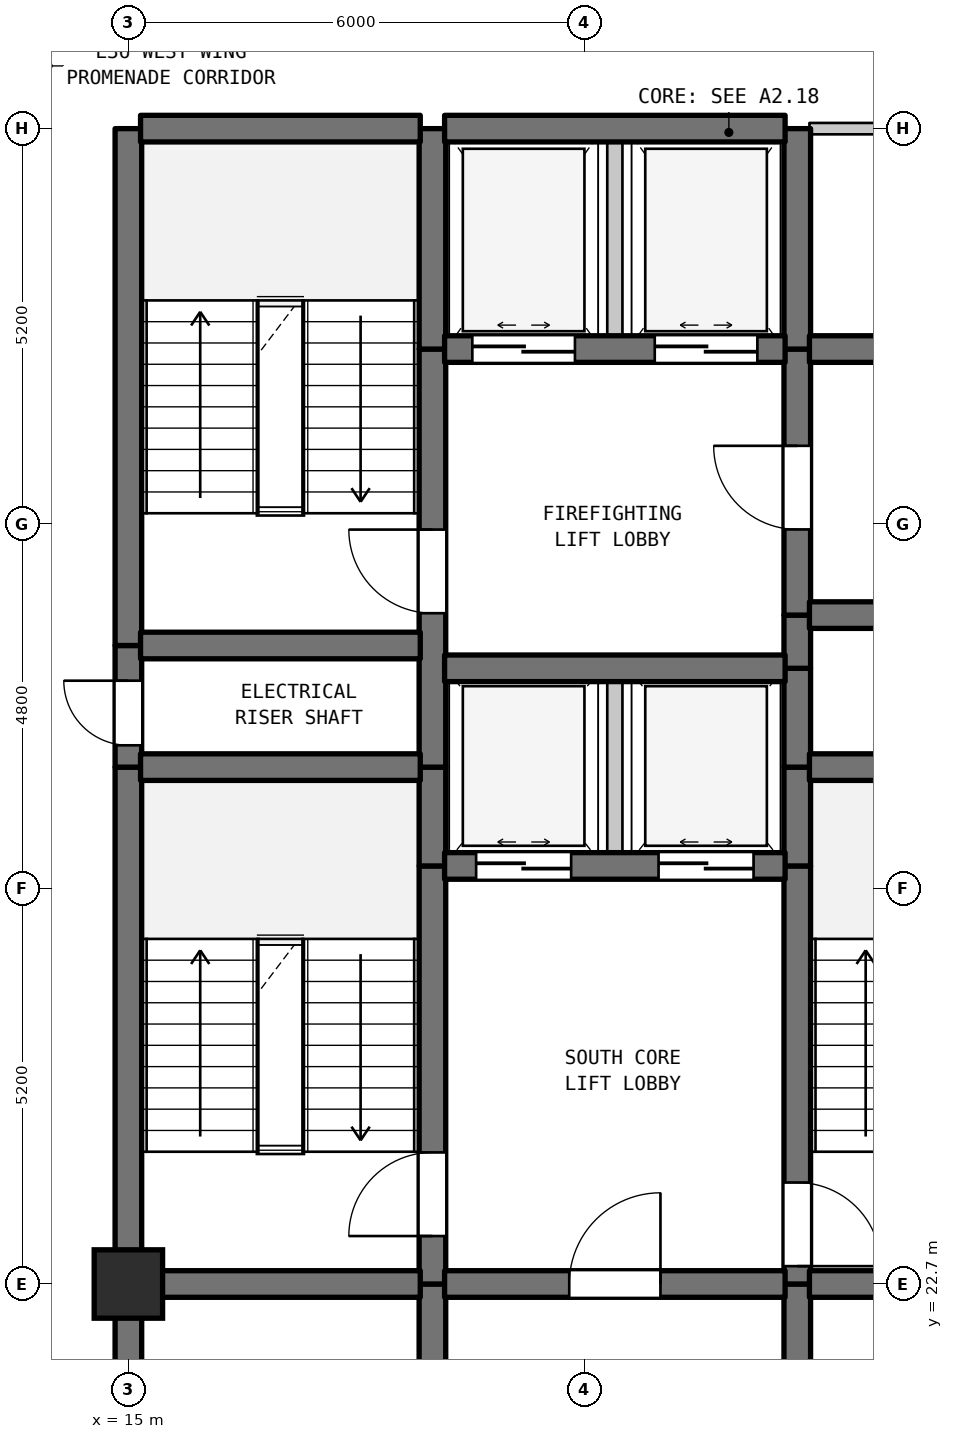
"""IFC4 building model, lengths in metres.
Left out: names, types, materials, properties, quantities, classifications, styles, units other than length and angle.
Written with IfcOpenShell. Run it as: python <this file> out.ifc"""

import sys

from ifc_helpers import new_model, si_unit, direction, frame, frame_2d, origin, origin_2d, place, context, subcontext, project, spatial, rectangle, extrude, element, fill, save


model = new_model("IFC4")
c1 = context("Model", 3, precision=1e-05, world=origin(), true_north=direction((0.0, 1.0)))
c2 = subcontext(c1, "Body", "Model", "MODEL_VIEW")
j1 = project(units=[si_unit("LENGTHUNIT", "METRE"), si_unit("PLANEANGLEUNIT", "RADIAN")], contexts=[c1])
p1 = place(None, origin())
s1 = spatial("IfcSite", under=j1, at=p1, CompositionType="ELEMENT")
p2 = place(p1, origin())
s2 = spatial("IfcBuilding", under=s1, at=p2, CompositionType="ELEMENT")
p3 = place(p2, frame((0.0, 0.0, 148.3)))
s3 = spatial("IfcBuildingStorey", under=s2, at=p3, CompositionType="ELEMENT", Elevation=148.3)
p4 = place(p3, frame((15.0, 22.7, 0.0), z_axis=(0.0, 0.0, 1.0), x_axis=(1.0, 0.0, 0.0)))
e1 = element("IfcColumn", 1, at=p4, inside=s3, PredefinedType="COLUMN", context=c2, shape_type="SweptSolid", body=[
    extrude(rectangle(XDim=0.9, YDim=0.9, at=origin_2d()), origin(), (0.0, 0.0, 1.0), 3.7),
])
p5 = place(p3, frame((15.0, 19.5, 0.0), z_axis=(0.0, 0.0, 1.0), x_axis=(0.0, 1.0, 0.0)))
e2 = element("IfcWall", 2, at=p5, inside=s3, PredefinedType="SHEAR", context=c2, shape_type="SweptSolid", body=[
    extrude(rectangle(XDim=3.2, YDim=0.35, at=frame_2d((1.6, 0.0))), origin(), (0.0, 0.0, 1.0), 3.385),
])
p6 = place(p3, frame((15.0, 22.7, 0.0), z_axis=(0.0, 0.0, 1.0), x_axis=(0.0, 1.0, 0.0)))
e3 = element("IfcWall", 3, at=p6, inside=s3, PredefinedType="SHEAR", context=c2, shape_type="SweptSolid", body=[
    extrude(rectangle(XDim=6.8, YDim=0.35, at=frame_2d((3.4, 0.0))), origin(), (0.0, 0.0, 1.0), 3.385),
])
p7 = place(p3, frame((15.0, 29.5, 0.0), z_axis=(0.0, 0.0, 1.0), x_axis=(0.0, 1.0, 0.0)))
e4 = element("IfcWall", 4, at=p7, inside=s3, PredefinedType="SHEAR", context=c2, shape_type="SweptSolid", body=[
    extrude(rectangle(XDim=1.6, YDim=0.35, at=frame_2d((0.8, 0.0))), origin(), (0.0, 0.0, 1.0), 3.385),
])
p8 = place(p7, frame((0.287, 0.0, 0.0)))
e5 = element("IfcOpeningElement", 5, at=p8, cuts=e4, PredefinedType="OPENING", context=c2, shape_type="SweptSolid", body=[
    extrude(rectangle(XDim=0.85, YDim=2.1, at=frame_2d((0.425, 1.05))), frame((0.0, 0.185, 0.0), z_axis=(0.0, -1.0, 0.0), x_axis=(1.0, 0.0, 0.0)), (0.0, 0.0, 1.0), 0.37),
])
p9 = place(p3, frame((15.0, 31.1, 0.0), z_axis=(0.0, 0.0, 1.0), x_axis=(0.0, 1.0, 0.0)))
e6 = element("IfcWall", 6, at=p9, inside=s3, PredefinedType="SHEAR", context=c2, shape_type="SweptSolid", body=[
    extrude(rectangle(XDim=6.8, YDim=0.35, at=frame_2d((3.4, 0.0))), origin(), (0.0, 0.0, 1.0), 3.385),
])
p10 = place(p3, frame((19.0, 19.5, 0.0), z_axis=(0.0, 0.0, 1.0), x_axis=(0.0, 1.0, 0.0)))
e7 = element("IfcWall", 7, at=p10, inside=s3, PredefinedType="SHEAR", context=c2, shape_type="SweptSolid", body=[
    extrude(rectangle(XDim=3.2, YDim=0.35, at=frame_2d((1.6, 0.0))), origin(), (0.0, 0.0, 1.0), 3.385),
])
p11 = place(p3, frame((19.0, 22.7, 0.0), z_axis=(0.0, 0.0, 1.0), x_axis=(0.0, 1.0, 0.0)))
e8 = element("IfcWall", 8, at=p11, inside=s3, PredefinedType="SHEAR", context=c2, shape_type="SweptSolid", body=[
    extrude(rectangle(XDim=5.5, YDim=0.35, at=frame_2d((2.75, 0.0))), origin(), (0.0, 0.0, 1.0), 3.385),
])
p12 = place(p11, frame((0.631, 0.0, 0.0)))
e9 = element("IfcOpeningElement", 9, at=p12, cuts=e8, PredefinedType="OPENING", context=c2, shape_type="SweptSolid", body=[
    extrude(rectangle(XDim=1.1, YDim=2.15, at=frame_2d((0.55, 1.075))), frame((0.0, 0.185, 0.0), z_axis=(0.0, -1.0, 0.0), x_axis=(1.0, 0.0, 0.0)), (0.0, 0.0, 1.0), 0.37),
])
p13 = place(p3, frame((19.0, 28.2, 0.0), z_axis=(0.0, 0.0, 1.0), x_axis=(0.0, 1.0, 0.0)))
e10 = element("IfcWall", 10, at=p13, inside=s3, PredefinedType="SHEAR", context=c2, shape_type="SweptSolid", body=[
    extrude(rectangle(XDim=1.3, YDim=0.35, at=frame_2d((0.65, 0.0))), origin(), (0.0, 0.0, 1.0), 3.385),
])
p14 = place(p3, frame((19.0, 29.5, 0.0), z_axis=(0.0, 0.0, 1.0), x_axis=(0.0, 1.0, 0.0)))
e11 = element("IfcWall", 11, at=p14, inside=s3, PredefinedType="SHEAR", context=c2, shape_type="SweptSolid", body=[
    extrude(rectangle(XDim=5.5, YDim=0.35, at=frame_2d((2.75, 0.0))), origin(), (0.0, 0.0, 1.0), 3.385),
])
p15 = place(p14, frame((2.025, 0.0, 0.0)))
e12 = element("IfcOpeningElement", 12, at=p15, cuts=e11, PredefinedType="OPENING", context=c2, shape_type="SweptSolid", body=[
    extrude(rectangle(XDim=1.1, YDim=2.15, at=frame_2d((0.55, 1.075))), frame((0.0, 0.185, 0.0), z_axis=(0.0, -1.0, 0.0), x_axis=(1.0, 0.0, 0.0)), (0.0, 0.0, 1.0), 0.37),
])
p16 = place(p3, frame((19.0, 35.0, 0.0), z_axis=(0.0, 0.0, 1.0), x_axis=(0.0, 1.0, 0.0)))
e13 = element("IfcWall", 13, at=p16, inside=s3, PredefinedType="SHEAR", context=c2, shape_type="SweptSolid", body=[
    extrude(rectangle(XDim=2.9, YDim=0.35, at=frame_2d((1.45, 0.0))), origin(), (0.0, 0.0, 1.0), 3.385),
])
p17 = place(p3, frame((21.4, 28.2, 0.0), z_axis=(0.0, 0.0, 1.0), x_axis=(0.0, 1.0, 0.0)))
e14 = element("IfcWall", 14, at=p17, inside=s3, PredefinedType="STANDARD", context=c2, shape_type="SweptSolid", body=[
    extrude(rectangle(XDim=2.6, YDim=0.2, at=frame_2d((1.3, 0.0))), origin(), (0.0, 0.0, 1.0), 3.385),
])
p18 = place(p3, frame((21.4, 35.0, 0.0), z_axis=(0.0, 0.0, 1.0), x_axis=(0.0, 1.0, 0.0)))
e15 = element("IfcWall", 15, at=p18, inside=s3, PredefinedType="STANDARD", context=c2, shape_type="SweptSolid", body=[
    extrude(rectangle(XDim=2.9, YDim=0.2, at=frame_2d((1.45, 0.0))), origin(), (0.0, 0.0, 1.0), 3.385),
])
p19 = place(p3, frame((23.8, 19.5, 0.0), z_axis=(0.0, 0.0, 1.0), x_axis=(0.0, 1.0, 0.0)))
e16 = element("IfcWall", 16, at=p19, inside=s3, PredefinedType="SHEAR", context=c2, shape_type="SweptSolid", body=[
    extrude(rectangle(XDim=3.2, YDim=0.35, at=frame_2d((1.6, 0.0))), origin(), (0.0, 0.0, 1.0), 3.385),
])
p20 = place(p3, frame((23.8, 22.7, 0.0), z_axis=(0.0, 0.0, 1.0), x_axis=(0.0, 1.0, 0.0)))
e17 = element("IfcWall", 17, at=p20, inside=s3, PredefinedType="SHEAR", context=c2, shape_type="SweptSolid", body=[
    extrude(rectangle(XDim=5.5, YDim=0.35, at=frame_2d((2.75, 0.0))), origin(), (0.0, 0.0, 1.0), 3.385),
])
p21 = place(p20, frame((0.235, 0.0, 0.0)))
e18 = element("IfcOpeningElement", 18, at=p21, cuts=e17, PredefinedType="OPENING", context=c2, shape_type="SweptSolid", body=[
    extrude(rectangle(XDim=1.1, YDim=2.15, at=frame_2d((0.55, 1.075))), frame((0.0, 0.185, 0.0), z_axis=(0.0, -1.0, 0.0), x_axis=(1.0, 0.0, 0.0)), (0.0, 0.0, 1.0), 0.37),
])
for number, where, z_axis, x_axis in (
    (19, (23.8, 28.2, 0.0), (0.0, 0.0, 1.0), (0.0, 1.0, 0.0)),
    (20, (23.8, 29.5, 0.0), (0.0, 0.0, 1.0), (0.0, 1.0, 0.0)),
):
    element("IfcWall", number, at=place(p3, frame(where, z_axis=z_axis, x_axis=x_axis)), inside=s3, PredefinedType="SHEAR", context=c2, shape_type="SweptSolid", body=[
        extrude(rectangle(XDim=1.3, YDim=0.35, at=frame_2d((0.65, 0.0))), origin(), (0.0, 0.0, 1.0), 3.385),
    ])
p22 = place(p3, frame((23.8, 30.8, 0.0), z_axis=(0.0, 0.0, 1.0), x_axis=(0.0, 1.0, 0.0)))
e21 = element("IfcWall", 21, at=p22, inside=s3, PredefinedType="SHEAR", context=c2, shape_type="SweptSolid", body=[
    extrude(rectangle(XDim=0.7, YDim=0.35, at=frame_2d((0.35, 0.0))), origin(), (0.0, 0.0, 1.0), 3.385),
])
p23 = place(p3, frame((23.8, 31.5, 0.0), z_axis=(0.0, 0.0, 1.0), x_axis=(0.0, 1.0, 0.0)))
e22 = element("IfcWall", 22, at=p23, inside=s3, PredefinedType="SHEAR", context=c2, shape_type="SweptSolid", body=[
    extrude(rectangle(XDim=3.5, YDim=0.35, at=frame_2d((1.75, 0.0))), origin(), (0.0, 0.0, 1.0), 3.385),
])
p24 = place(p23, frame((1.127, 0.0, 0.0)))
e23 = element("IfcOpeningElement", 23, at=p24, cuts=e22, PredefinedType="OPENING", context=c2, shape_type="SweptSolid", body=[
    extrude(rectangle(XDim=1.1, YDim=2.15, at=frame_2d((0.55, 1.075))), frame((0.0, 0.185, 0.0), z_axis=(0.0, -1.0, 0.0), x_axis=(1.0, 0.0, 0.0)), (0.0, 0.0, 1.0), 0.37),
])
p25 = place(p3, frame((23.8, 35.0, 0.0), z_axis=(0.0, 0.0, 1.0), x_axis=(0.0, 1.0, 0.0)))
e24 = element("IfcWall", 24, at=p25, inside=s3, PredefinedType="SHEAR", context=c2, shape_type="SweptSolid", body=[
    extrude(rectangle(XDim=2.9, YDim=0.35, at=frame_2d((1.45, 0.0))), origin(), (0.0, 0.0, 1.0), 3.385),
])
p26 = place(p3, frame((15.16, 22.7, 0.0), z_axis=(0.0, 0.0, 1.0), x_axis=(1.0, 0.0, 0.0)))
e25 = element("IfcWall", 25, at=p26, inside=s3, PredefinedType="SHEAR", context=c2, shape_type="SweptSolid", body=[
    extrude(rectangle(XDim=3.68, YDim=0.35, at=frame_2d((1.84, 0.0))), origin(), (0.0, 0.0, 1.0), 3.385),
])
p27 = place(p3, frame((19.16, 22.7, 0.0), z_axis=(0.0, 0.0, 1.0), x_axis=(1.0, 0.0, 0.0)))
e26 = element("IfcWall", 26, at=p27, inside=s3, PredefinedType="SHEAR", context=c2, shape_type="SweptSolid", body=[
    extrude(rectangle(XDim=4.48, YDim=0.35, at=frame_2d((2.24, 0.0))), origin(), (0.0, 0.0, 1.0), 3.385),
])
p28 = place(p27, frame((1.64, 0.0, 0.0)))
e27 = element("IfcOpeningElement", 27, at=p28, cuts=e26, PredefinedType="OPENING", context=c2, shape_type="SweptSolid", body=[
    extrude(rectangle(XDim=1.2, YDim=2.2, at=frame_2d((0.6, 1.1))), frame((0.0, 0.185, 0.0), z_axis=(0.0, -1.0, 0.0), x_axis=(1.0, 0.0, 0.0)), (0.0, 0.0, 1.0), 0.37),
])
p29 = place(p3, frame((23.96, 22.7, 0.0), z_axis=(0.0, 0.0, 1.0), x_axis=(1.0, 0.0, 0.0)))
e28 = element("IfcWall", 28, at=p29, inside=s3, PredefinedType="SHEAR", context=c2, shape_type="SweptSolid", body=[
    extrude(rectangle(XDim=3.155, YDim=0.35, at=frame_2d((1.578, 0.0))), origin(), (0.0, 0.0, 1.0), 3.385),
])
p30 = place(p3, frame((19.16, 28.2, 0.0), z_axis=(0.0, 0.0, 1.0), x_axis=(1.0, 0.0, 0.0)))
e29 = element("IfcWall", 29, at=p30, inside=s3, PredefinedType="SHEAR", context=c2, shape_type="SweptSolid", body=[
    extrude(rectangle(XDim=4.48, YDim=0.35, at=frame_2d((2.24, 0.0))), origin(), (0.0, 0.0, 1.0), 3.385),
])
p31 = place(p30, frame((0.415, 0.0, 0.0)))
e30 = element("IfcOpeningElement", 30, at=p31, cuts=e29, PredefinedType="OPENING", context=c2, shape_type="SweptSolid", body=[
    extrude(rectangle(XDim=1.25, YDim=2.2, at=frame_2d((0.625, 1.1))), frame((0.0, 0.185, 0.0), z_axis=(0.0, -1.0, 0.0), x_axis=(1.0, 0.0, 0.0)), (0.0, 0.0, 1.0), 0.37),
])
p32 = place(p30, frame((2.815, 0.0, 0.0)))
e31 = element("IfcOpeningElement", 31, at=p32, cuts=e29, PredefinedType="OPENING", context=c2, shape_type="SweptSolid", body=[
    extrude(rectangle(XDim=1.25, YDim=2.2, at=frame_2d((0.625, 1.1))), frame((0.0, 0.185, 0.0), z_axis=(0.0, -1.0, 0.0), x_axis=(1.0, 0.0, 0.0)), (0.0, 0.0, 1.0), 0.37),
])
p33 = place(p3, frame((15.16, 29.5, 0.0), z_axis=(0.0, 0.0, 1.0), x_axis=(1.0, 0.0, 0.0)))
e32 = element("IfcWall", 32, at=p33, inside=s3, PredefinedType="SHEAR", context=c2, shape_type="SweptSolid", body=[
    extrude(rectangle(XDim=3.68, YDim=0.35, at=frame_2d((1.84, 0.0))), origin(), (0.0, 0.0, 1.0), 3.385),
])
p34 = place(p3, frame((23.96, 29.5, 0.0), z_axis=(0.0, 0.0, 1.0), x_axis=(1.0, 0.0, 0.0)))
e33 = element("IfcWall", 33, at=p34, inside=s3, PredefinedType="SHEAR", context=c2, shape_type="SweptSolid", body=[
    extrude(rectangle(XDim=3.18, YDim=0.35, at=frame_2d((1.59, 0.0))), origin(), (0.0, 0.0, 1.0), 3.385),
])
p35 = place(p3, frame((19.16, 30.8, 0.0), z_axis=(0.0, 0.0, 1.0), x_axis=(1.0, 0.0, 0.0)))
e34 = element("IfcWall", 34, at=p35, inside=s3, PredefinedType="SHEAR", context=c2, shape_type="SweptSolid", body=[
    extrude(rectangle(XDim=4.48, YDim=0.35, at=frame_2d((2.24, 0.0))), origin(), (0.0, 0.0, 1.0), 3.385),
])
p36 = place(p3, frame((15.16, 31.1, 0.0), z_axis=(0.0, 0.0, 1.0), x_axis=(1.0, 0.0, 0.0)))
e35 = element("IfcWall", 35, at=p36, inside=s3, PredefinedType="SHEAR", context=c2, shape_type="SweptSolid", body=[
    extrude(rectangle(XDim=3.68, YDim=0.35, at=frame_2d((1.84, 0.0))), origin(), (0.0, 0.0, 1.0), 3.385),
])
p37 = place(p3, frame((23.96, 31.5, 0.0), z_axis=(0.0, 0.0, 1.0), x_axis=(1.0, 0.0, 0.0)))
e36 = element("IfcWall", 36, at=p37, inside=s3, PredefinedType="SHEAR", context=c2, shape_type="SweptSolid", body=[
    extrude(rectangle(XDim=3.18, YDim=0.35, at=frame_2d((1.59, 0.0))), origin(), (0.0, 0.0, 1.0), 3.385),
])
p38 = place(p37, frame((1.094, 0.0, 0.0)))
e37 = element("IfcOpeningElement", 37, at=p38, cuts=e36, PredefinedType="OPENING", context=c2, shape_type="SweptSolid", body=[
    extrude(rectangle(XDim=0.85, YDim=2.1, at=frame_2d((0.425, 1.05))), frame((0.0, 0.185, 0.0), z_axis=(0.0, -1.0, 0.0), x_axis=(1.0, 0.0, 0.0)), (0.0, 0.0, 1.0), 0.37),
])
p39 = place(p3, frame((19.16, 35.0, 0.0), z_axis=(0.0, 0.0, 1.0), x_axis=(1.0, 0.0, 0.0)))
e38 = element("IfcWall", 38, at=p39, inside=s3, PredefinedType="SHEAR", context=c2, shape_type="SweptSolid", body=[
    extrude(rectangle(XDim=4.48, YDim=0.35, at=frame_2d((2.24, 0.0))), origin(), (0.0, 0.0, 1.0), 3.385),
])
p40 = place(p39, frame((0.365, 0.0, 0.0)))
e39 = element("IfcOpeningElement", 39, at=p40, cuts=e38, PredefinedType="OPENING", context=c2, shape_type="SweptSolid", body=[
    extrude(rectangle(XDim=1.35, YDim=2.2, at=frame_2d((0.675, 1.1))), frame((0.0, 0.185, 0.0), z_axis=(0.0, -1.0, 0.0), x_axis=(1.0, 0.0, 0.0)), (0.0, 0.0, 1.0), 0.37),
])
p41 = place(p39, frame((2.765, 0.0, 0.0)))
e40 = element("IfcOpeningElement", 40, at=p41, cuts=e38, PredefinedType="OPENING", context=c2, shape_type="SweptSolid", body=[
    extrude(rectangle(XDim=1.35, YDim=2.2, at=frame_2d((0.675, 1.1))), frame((0.0, 0.185, 0.0), z_axis=(0.0, -1.0, 0.0), x_axis=(1.0, 0.0, 0.0)), (0.0, 0.0, 1.0), 0.37),
])
p42 = place(p3, frame((23.96, 35.0, 0.0), z_axis=(0.0, 0.0, 1.0), x_axis=(1.0, 0.0, 0.0)))
e41 = element("IfcWall", 41, at=p42, inside=s3, PredefinedType="SHEAR", context=c2, shape_type="SweptSolid", body=[
    extrude(rectangle(XDim=3.995, YDim=0.35, at=frame_2d((1.998, 0.0))), origin(), (0.0, 0.0, 1.0), 3.385),
])
p43 = place(p42, frame((1.393, 0.0, 0.0)))
e42 = element("IfcOpeningElement", 42, at=p43, cuts=e41, PredefinedType="OPENING", context=c2, shape_type="SweptSolid", body=[
    extrude(rectangle(XDim=0.95, YDim=2.15, at=frame_2d((0.475, 1.075))), frame((0.0, 0.185, 0.0), z_axis=(0.0, -1.0, 0.0), x_axis=(1.0, 0.0, 0.0)), (0.0, 0.0, 1.0), 0.37),
])
p44 = place(p3, frame((15.16, 37.9, 0.0), z_axis=(0.0, 0.0, 1.0), x_axis=(1.0, 0.0, 0.0)))
e43 = element("IfcWall", 43, at=p44, inside=s3, PredefinedType="SHEAR", context=c2, shape_type="SweptSolid", body=[
    extrude(rectangle(XDim=3.68, YDim=0.35, at=frame_2d((1.84, 0.0))), origin(), (0.0, 0.0, 1.0), 3.385),
])
p45 = place(p3, frame((19.16, 37.9, 0.0), z_axis=(0.0, 0.0, 1.0), x_axis=(1.0, 0.0, 0.0)))
e44 = element("IfcWall", 44, at=p45, inside=s3, PredefinedType="SHEAR", context=c2, shape_type="SweptSolid", body=[
    extrude(rectangle(XDim=4.48, YDim=0.35, at=frame_2d((2.24, 0.0))), origin(), (0.0, 0.0, 1.0), 3.385),
])
p46 = place(p3, frame((23.96, 37.9, 0.0), z_axis=(0.0, 0.0, 1.0), x_axis=(1.0, 0.0, 0.0)))
e45 = element("IfcWall", 45, at=p46, inside=s3, PredefinedType="STANDARD", context=c2, shape_type="SweptSolid", body=[
    extrude(rectangle(XDim=3.995, YDim=0.15, at=frame_2d((1.998, 0.0))), origin(), (0.0, 0.0, 1.0), 2.885),
])
p47 = place(p8, origin())
e46 = element("IfcDoor", 46, at=p47, inside=s3, OperationType="SINGLE_SWING_RIGHT", PredefinedType="DOOR", context=c2, shape_type="SweptSolid", body=[
    extrude(rectangle(XDim=0.85, YDim=2.1, at=frame_2d((0.425, 1.05))), frame((0.0, 0.025, 0.0), z_axis=(0.0, -1.0, 0.0), x_axis=(1.0, 0.0, 0.0)), (0.0, 0.0, 1.0), 0.05),
])
fill(e5, e46)
p48 = place(p12, origin())
e47 = element("IfcDoor", 47, at=p48, inside=s3, OperationType="SINGLE_SWING_LEFT", PredefinedType="DOOR", context=c2, shape_type="SweptSolid", body=[
    extrude(rectangle(XDim=1.1, YDim=2.15, at=frame_2d((0.55, 1.075))), frame((0.0, 0.025, 0.0), z_axis=(0.0, -1.0, 0.0), x_axis=(1.0, 0.0, 0.0)), (0.0, 0.0, 1.0), 0.05),
])
fill(e9, e47)
p49 = place(p15, origin())
e48 = element("IfcDoor", 48, at=p49, inside=s3, OperationType="SINGLE_SWING_RIGHT", PredefinedType="DOOR", context=c2, shape_type="SweptSolid", body=[
    extrude(rectangle(XDim=1.1, YDim=2.15, at=frame_2d((0.55, 1.075))), frame((0.0, 0.025, 0.0), z_axis=(0.0, -1.0, 0.0), x_axis=(1.0, 0.0, 0.0)), (0.0, 0.0, 1.0), 0.05),
])
fill(e12, e48)
p50 = place(p21, frame((1.1, 0.0, 0.0), z_axis=(0.0, 0.0, 1.0), x_axis=(-1.0, 0.0, 0.0)))
e49 = element("IfcDoor", 49, at=p50, inside=s3, OperationType="SINGLE_SWING_LEFT", PredefinedType="DOOR", context=c2, shape_type="SweptSolid", body=[
    extrude(rectangle(XDim=1.1, YDim=2.15, at=frame_2d((0.55, 1.075))), frame((0.0, 0.025, 0.0), z_axis=(0.0, -1.0, 0.0), x_axis=(1.0, 0.0, 0.0)), (0.0, 0.0, 1.0), 0.05),
])
fill(e18, e49)
p51 = place(p24, origin())
e50 = element("IfcDoor", 50, at=p51, inside=s3, OperationType="SINGLE_SWING_RIGHT", PredefinedType="DOOR", context=c2, shape_type="SweptSolid", body=[
    extrude(rectangle(XDim=1.1, YDim=2.15, at=frame_2d((0.55, 1.075))), frame((0.0, 0.025, 0.0), z_axis=(0.0, -1.0, 0.0), x_axis=(1.0, 0.0, 0.0)), (0.0, 0.0, 1.0), 0.05),
])
fill(e23, e50)
p52 = place(p28, origin())
e51 = element("IfcDoor", 51, at=p52, inside=s3, OperationType="SINGLE_SWING_RIGHT", PredefinedType="DOOR", context=c2, shape_type="SweptSolid", body=[
    extrude(rectangle(XDim=1.2, YDim=2.2, at=frame_2d((0.6, 1.1))), frame((0.0, 0.025, 0.0), z_axis=(0.0, -1.0, 0.0), x_axis=(1.0, 0.0, 0.0)), (0.0, 0.0, 1.0), 0.05),
])
fill(e27, e51)
p53 = place(p31, origin())
e52 = element("IfcDoor", 52, at=p53, inside=s3, OperationType="DOUBLE_DOOR_SLIDING", PredefinedType="DOOR", context=c2, shape_type="SweptSolid", body=[
    extrude(rectangle(XDim=1.25, YDim=2.2, at=frame_2d((0.625, 1.1))), frame((0.0, 0.025, 0.0), z_axis=(0.0, -1.0, 0.0), x_axis=(1.0, 0.0, 0.0)), (0.0, 0.0, 1.0), 0.05),
])
fill(e30, e52)
p54 = place(p32, origin())
e53 = element("IfcDoor", 53, at=p54, inside=s3, OperationType="DOUBLE_DOOR_SLIDING", PredefinedType="DOOR", context=c2, shape_type="SweptSolid", body=[
    extrude(rectangle(XDim=1.25, YDim=2.2, at=frame_2d((0.625, 1.1))), frame((0.0, 0.025, 0.0), z_axis=(0.0, -1.0, 0.0), x_axis=(1.0, 0.0, 0.0)), (0.0, 0.0, 1.0), 0.05),
])
fill(e31, e53)
p55 = place(p40, origin())
e54 = element("IfcDoor", 54, at=p55, inside=s3, OperationType="DOUBLE_DOOR_SLIDING", PredefinedType="DOOR", context=c2, shape_type="SweptSolid", body=[
    extrude(rectangle(XDim=1.35, YDim=2.2, at=frame_2d((0.675, 1.1))), frame((0.0, 0.025, 0.0), z_axis=(0.0, -1.0, 0.0), x_axis=(1.0, 0.0, 0.0)), (0.0, 0.0, 1.0), 0.05),
])
fill(e39, e54)
p56 = place(p41, origin())
e55 = element("IfcDoor", 55, at=p56, inside=s3, OperationType="DOUBLE_DOOR_SLIDING", PredefinedType="DOOR", context=c2, shape_type="SweptSolid", body=[
    extrude(rectangle(XDim=1.35, YDim=2.2, at=frame_2d((0.675, 1.1))), frame((0.0, 0.025, 0.0), z_axis=(0.0, -1.0, 0.0), x_axis=(1.0, 0.0, 0.0)), (0.0, 0.0, 1.0), 0.05),
])
fill(e40, e55)
save(model, sys.argv[1])
